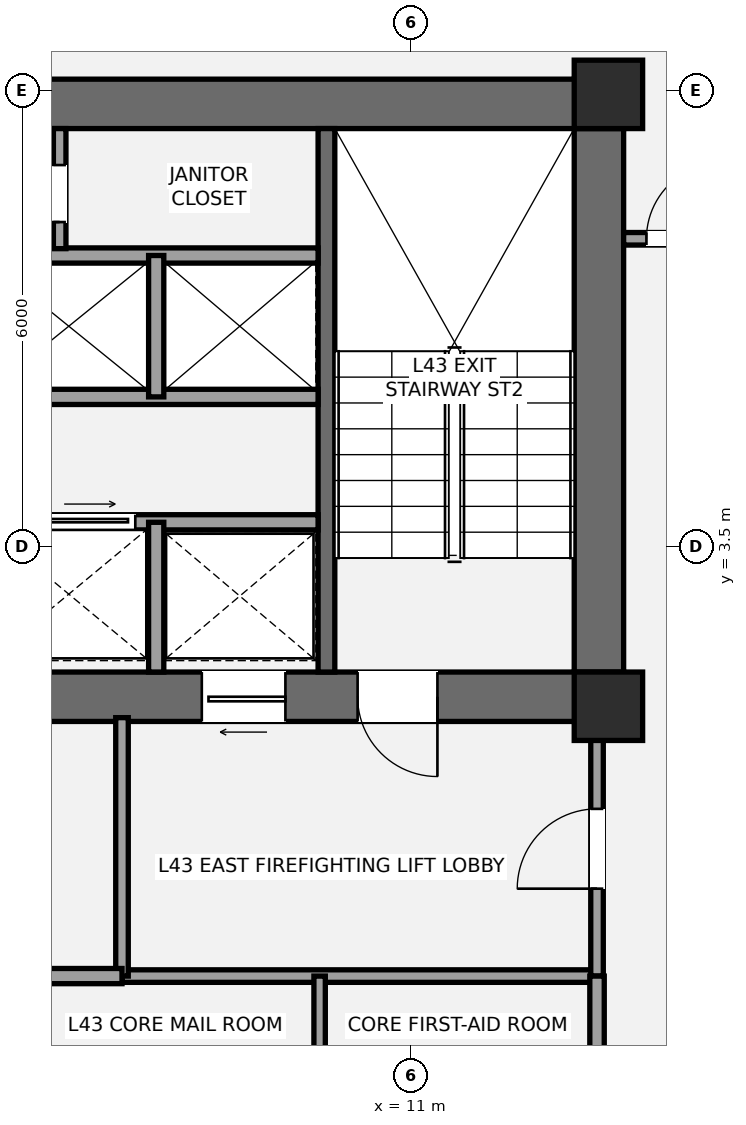
"""IFC4 building model, lengths in metres.
Left out: names, types, materials, properties, quantities, classifications, styles, units other than length and angle.
Written with IfcOpenShell. Run it as: python <this file> out.ifc"""

import sys

from ifc_helpers import new_model, si_unit, direction, frame, frame_2d, origin, origin_2d, place, context, subcontext, project, spatial, rectangle, extrude, element, fill, save


model = new_model("IFC4")
c1 = context("Model", 3, precision=1e-05, world=origin(), true_north=direction((0.0, 1.0)))
c2 = subcontext(c1, "Body", "Model", "MODEL_VIEW")
j1 = project(units=[si_unit("LENGTHUNIT", "METRE"), si_unit("PLANEANGLEUNIT", "RADIAN")], contexts=[c1])
p1 = place(None, origin())
s1 = spatial("IfcSite", under=j1, at=p1, CompositionType="ELEMENT")
p2 = place(p1, origin())
s2 = spatial("IfcBuilding", under=s1, at=p2, CompositionType="ELEMENT")
p3 = place(p2, frame((0.0, 0.0, 159.8)))
s3 = spatial("IfcBuildingStorey", under=s2, at=p3, CompositionType="ELEMENT", Elevation=159.8)
p4 = place(p3, frame((13.475, 1.2, 0.0), z_axis=(0.0, 0.0, 1.0), x_axis=(0.0, 1.0, 0.0)))
e1 = element("IfcWall", 1, at=p4, inside=s3, PredefinedType="SHEAR", context=c2, shape_type="SweptSolid", body=[
    extrude(rectangle(XDim=8.45, YDim=0.65, at=frame_2d((4.225, 0.0))), origin(), (0.0, 0.0, 1.0), 3.2),
])
p5 = place(p3, frame((4.475, 9.325, 0.0), z_axis=(0.0, 0.0, 1.0), x_axis=(1.0, 0.0, 0.0)))
e2 = element("IfcWall", 2, at=p5, inside=s3, PredefinedType="SHEAR", context=c2, shape_type="SweptSolid", body=[
    extrude(rectangle(XDim=9.325, YDim=0.65, at=frame_2d((4.663, 0.0))), origin(), (0.0, 0.0, 1.0), 3.2),
])
p6 = place(p3, frame((13.8, 1.525, 0.0), z_axis=(0.0, 0.0, 1.0), x_axis=(-1.0, 0.0, 0.0)))
e3 = element("IfcWall", 3, at=p6, inside=s3, PredefinedType="SHEAR", context=c2, shape_type="SweptSolid", body=[
    extrude(rectangle(XDim=8.925, YDim=0.65, at=frame_2d((4.462, 0.0))), origin(), (0.0, 0.0, 1.0), 3.2),
])
p7 = place(p6, frame((2.45, 0.0, 0.0)))
e4 = element("IfcOpeningElement", 4, at=p7, cuts=e3, PredefinedType="OPENING", context=c2, shape_type="SweptSolid", body=[
    extrude(rectangle(XDim=1.05, YDim=2.15, at=frame_2d((0.525, 1.075))), frame((0.0, 0.335, 0.0), z_axis=(0.0, -1.0, 0.0), x_axis=(1.0, 0.0, 0.0)), (0.0, 0.0, 1.0), 0.67),
])
p8 = place(p6, frame((4.45, 0.0, 0.0)))
e5 = element("IfcOpeningElement", 5, at=p8, cuts=e3, PredefinedType="OPENING", context=c2, shape_type="SweptSolid", body=[
    extrude(rectangle(XDim=1.1, YDim=2.2, at=frame_2d((0.55, 1.1))), frame((0.0, 0.335, 0.0), z_axis=(0.0, -1.0, 0.0), x_axis=(1.0, 0.0, 0.0)), (0.0, 0.0, 1.0), 0.67),
])
p9 = place(p3, frame((9.89, 1.85, 0.0), z_axis=(0.0, 0.0, 1.0), x_axis=(0.0, 1.0, 0.0)))
e6 = element("IfcWall", 6, at=p9, inside=s3, PredefinedType="SHEAR", context=c2, shape_type="SweptSolid", body=[
    extrude(rectangle(XDim=7.15, YDim=0.22, at=frame_2d((3.575, 0.0))), origin(), (0.0, 0.0, 1.0), 3.2),
])
for number, where, z_axis, x_axis in (
    (7, (13.6, 1.4, 0.0), (0.0, 0.0, 1.0), (1.0, 0.0, 0.0)),
    (8, (13.6, 9.45, 0.0), (0.0, 0.0, 1.0), (1.0, 0.0, 0.0)),
):
    element("IfcColumn", number, at=place(p3, frame(where, z_axis=z_axis, x_axis=x_axis)), inside=s3, PredefinedType="COLUMN", context=c2, shape_type="SweptSolid", body=[
        extrude(rectangle(XDim=0.9, YDim=0.9, at=origin_2d()), origin(), (0.0, 0.0, 1.0), 3.2),
    ])
p10 = place(p3, frame((7.2, -2.15, 0.0), z_axis=(0.0, 0.0, 1.0), x_axis=(1.0, 0.0, 0.0)))
e9 = element("IfcWall", 9, at=p10, inside=s3, PredefinedType="PARTITIONING", context=c2, shape_type="SweptSolid", body=[
    extrude(rectangle(XDim=6.25, YDim=0.165, at=frame_2d((3.125, 0.0))), origin(), (0.0, 0.0, 1.0), 3.02),
])
p11 = place(p3, frame((7.2, -2.15, 0.0), z_axis=(0.0, 0.0, 1.0), x_axis=(0.0, 1.0, 0.0)))
e10 = element("IfcWall", 10, at=p11, inside=s3, PredefinedType="PARTITIONING", context=c2, shape_type="SweptSolid", body=[
    extrude(rectangle(XDim=3.4, YDim=0.165, at=frame_2d((1.7, 0.0))), origin(), (0.0, 0.0, 1.0), 2.473),
])
p12 = place(p3, frame((13.45, -2.15, 0.0), z_axis=(0.0, 0.0, 1.0), x_axis=(0.0, 1.0, 0.0)))
e11 = element("IfcWall", 11, at=p12, inside=s3, PredefinedType="PARTITIONING", context=c2, shape_type="SweptSolid", body=[
    extrude(rectangle(XDim=3.4, YDim=0.165, at=frame_2d((1.7, 0.0))), origin(), (0.0, 0.0, 1.0), 3.02),
])
p13 = place(p12, frame((1.15, 0.0, 0.0)))
e12 = element("IfcOpeningElement", 12, at=p13, cuts=e11, PredefinedType="OPENING", context=c2, shape_type="SweptSolid", body=[
    extrude(rectangle(XDim=1.05, YDim=2.15, at=frame_2d((0.525, 1.075))), frame((0.0, 0.093, 0.0), z_axis=(0.0, -1.0, 0.0), x_axis=(1.0, 0.0, 0.0)), (0.0, 0.0, 1.0), 0.185),
])
p14 = place(p3, frame((4.95, -2.15, 0.0), z_axis=(0.0, 0.0, 1.0), x_axis=(1.0, 0.0, 0.0)))
e13 = element("IfcWall", 13, at=p14, inside=s3, PredefinedType="SOLIDWALL", context=c2, shape_type="SweptSolid", body=[
    extrude(rectangle(XDim=2.25, YDim=0.2, at=frame_2d((1.125, 0.0))), origin(), (0.0, 0.0, 1.0), 3.02),
])
p15 = place(p3, frame((5.525, 3.82, 0.0), z_axis=(0.0, 0.0, 1.0), x_axis=(1.0, 0.0, 0.0)))
e14 = element("IfcWall", 14, at=p15, inside=s3, PredefinedType="SOLIDWALL", context=c2, shape_type="SweptSolid", body=[
    extrude(rectangle(XDim=4.255, YDim=0.2, at=frame_2d((2.127, 0.0))), origin(), (0.0, 0.0, 1.0), 3.02),
])
p16 = place(p15, frame((0.65, 0.0, 0.0)))
e15 = element("IfcOpeningElement", 15, at=p16, cuts=e14, PredefinedType="OPENING", context=c2, shape_type="SweptSolid", body=[
    extrude(rectangle(XDim=1.2, YDim=2.2, at=frame_2d((0.6, 1.1))), frame((0.0, 0.11, 0.0), z_axis=(0.0, -1.0, 0.0), x_axis=(1.0, 0.0, 0.0)), (0.0, 0.0, 1.0), 0.22),
])
p17 = place(p3, frame((7.65, 1.85, 0.0), z_axis=(0.0, 0.0, 1.0), x_axis=(0.0, 1.0, 0.0)))
e16 = element("IfcWall", 16, at=p17, inside=s3, PredefinedType="SOLIDWALL", context=c2, shape_type="SweptSolid", body=[
    extrude(rectangle(XDim=1.97, YDim=0.2, at=frame_2d((0.985, 0.0))), origin(), (0.0, 0.0, 1.0), 3.02),
])
for number, where, z_axis, x_axis in (
    (17, (5.525, 5.47, 0.0), (0.0, 0.0, 1.0), (1.0, 0.0, 0.0)),
    (18, (5.525, 7.33, 0.0), (0.0, 0.0, 1.0), (1.0, 0.0, 0.0)),
):
    element("IfcWall", number, at=place(p3, frame(where, z_axis=z_axis, x_axis=x_axis)), inside=s3, PredefinedType="SOLIDWALL", context=c2, shape_type="SweptSolid", body=[
        extrude(rectangle(XDim=4.255, YDim=0.2, at=frame_2d((2.127, 0.0))), origin(), (0.0, 0.0, 1.0), 3.02),
    ])
p18 = place(p3, frame((7.65, 5.47, 0.0), z_axis=(0.0, 0.0, 1.0), x_axis=(0.0, 1.0, 0.0)))
e19 = element("IfcWall", 19, at=p18, inside=s3, PredefinedType="SOLIDWALL", context=c2, shape_type="SweptSolid", body=[
    extrude(rectangle(XDim=1.86, YDim=0.2, at=frame_2d((0.93, 0.0))), origin(), (0.0, 0.0, 1.0), 3.02),
])
p19 = place(p3, frame((6.38, 7.42, 0.0), z_axis=(0.0, 0.0, 1.0), x_axis=(0.0, 1.0, 0.0)))
e20 = element("IfcWall", 20, at=p19, inside=s3, PredefinedType="PARTITIONING", context=c2, shape_type="SweptSolid", body=[
    extrude(rectangle(XDim=1.58, YDim=0.165, at=frame_2d((0.79, 0.0))), origin(), (0.0, 0.0, 1.0), 3.02),
])
p20 = place(p19, frame((0.35, 0.0, 0.0)))
e21 = element("IfcOpeningElement", 21, at=p20, cuts=e20, PredefinedType="OPENING", context=c2, shape_type="SweptSolid", body=[
    extrude(rectangle(XDim=0.75, YDim=2.1, at=frame_2d((0.375, 1.05))), frame((0.0, 0.093, 0.0), z_axis=(0.0, -1.0, 0.0), x_axis=(1.0, 0.0, 0.0)), (0.0, 0.0, 1.0), 0.185),
])
p21 = place(p3, frame((13.45, -4.05, 0.0), z_axis=(0.0, 0.0, 1.0), x_axis=(0.0, 1.0, 0.0)))
e22 = element("IfcWall", 22, at=p21, inside=s3, PredefinedType="PLUMBINGWALL", context=c2, shape_type="SweptSolid", body=[
    extrude(rectangle(XDim=1.9, YDim=0.19, at=frame_2d((0.95, 0.0))), origin(), (0.0, 0.0, 1.0), 2.473),
])
p22 = place(p3, frame((9.8, -4.05, 0.0), z_axis=(0.0, 0.0, 1.0), x_axis=(0.0, 1.0, 0.0)))
e23 = element("IfcWall", 23, at=p22, inside=s3, PredefinedType="PLUMBINGWALL", context=c2, shape_type="SweptSolid", body=[
    extrude(rectangle(XDim=1.9, YDim=0.15, at=frame_2d((0.95, 0.0))), origin(), (0.0, 0.0, 1.0), 3.02),
])
p23 = place(p3, frame((13.8, 7.55, 0.0), z_axis=(0.0, 0.0, 1.0), x_axis=(1.0, 0.0, 0.0)))
e24 = element("IfcWall", 24, at=p23, inside=s3, PredefinedType="PARTITIONING", context=c2, shape_type="SweptSolid", body=[
    extrude(rectangle(XDim=1.75, YDim=0.165, at=frame_2d((0.875, 0.0))), origin(), (0.0, 0.0, 1.0), 2.473),
])
p24 = place(p23, frame((0.3, 0.0, 0.0)))
e25 = element("IfcOpeningElement", 25, at=p24, cuts=e24, PredefinedType="OPENING", context=c2, shape_type="SweptSolid", body=[
    extrude(rectangle(XDim=1.0, YDim=2.15, at=frame_2d((0.5, 1.075))), frame((0.0, 0.093, 0.0), z_axis=(0.0, -1.0, 0.0), x_axis=(1.0, 0.0, 0.0)), (0.0, 0.0, 1.0), 0.185),
])
p25 = place(p7, origin())
e26 = element("IfcDoor", 26, at=p25, inside=s3, OperationType="SINGLE_SWING_LEFT", PredefinedType="DOOR", context=c2, shape_type="SweptSolid", body=[
    extrude(rectangle(XDim=1.05, YDim=2.15, at=frame_2d((0.525, 1.075))), frame((0.0, 0.025, 0.0), z_axis=(0.0, -1.0, 0.0), x_axis=(1.0, 0.0, 0.0)), (0.0, 0.0, 1.0), 0.05),
])
fill(e4, e26)
p26 = place(p13, origin())
e27 = element("IfcDoor", 27, at=p26, inside=s3, OperationType="SINGLE_SWING_LEFT", PredefinedType="DOOR", context=c2, shape_type="SweptSolid", body=[
    extrude(rectangle(XDim=1.05, YDim=2.15, at=frame_2d((0.525, 1.075))), frame((0.0, 0.025, 0.0), z_axis=(0.0, -1.0, 0.0), x_axis=(1.0, 0.0, 0.0)), (0.0, 0.0, 1.0), 0.05),
])
fill(e12, e27)
p27 = place(p8, origin())
e28 = element("IfcDoor", 28, at=p27, inside=s3, OperationType="SLIDING_TO_LEFT", PredefinedType="DOOR", context=c2, shape_type="SweptSolid", body=[
    extrude(rectangle(XDim=1.1, YDim=2.2, at=frame_2d((0.55, 1.1))), frame((0.0, 0.025, 0.0), z_axis=(0.0, -1.0, 0.0), x_axis=(1.0, 0.0, 0.0)), (0.0, 0.0, 1.0), 0.05),
])
fill(e5, e28)
p28 = place(p16, origin())
e29 = element("IfcDoor", 29, at=p28, inside=s3, OperationType="SLIDING_TO_RIGHT", PredefinedType="DOOR", context=c2, shape_type="SweptSolid", body=[
    extrude(rectangle(XDim=1.2, YDim=2.2, at=frame_2d((0.6, 1.1))), frame((0.0, 0.025, 0.0), z_axis=(0.0, -1.0, 0.0), x_axis=(1.0, 0.0, 0.0)), (0.0, 0.0, 1.0), 0.05),
])
fill(e15, e29)
p29 = place(p20, origin())
e30 = element("IfcDoor", 30, at=p29, inside=s3, OperationType="SINGLE_SWING_LEFT", PredefinedType="DOOR", context=c2, shape_type="SweptSolid", body=[
    extrude(rectangle(XDim=0.75, YDim=2.1, at=frame_2d((0.375, 1.05))), frame((0.0, 0.025, 0.0), z_axis=(0.0, -1.0, 0.0), x_axis=(1.0, 0.0, 0.0)), (0.0, 0.0, 1.0), 0.05),
])
fill(e21, e30)
p30 = place(p24, origin())
e31 = element("IfcDoor", 31, at=p30, inside=s3, OperationType="SINGLE_SWING_RIGHT", PredefinedType="DOOR", context=c2, shape_type="SweptSolid", body=[
    extrude(rectangle(XDim=1.0, YDim=2.15, at=frame_2d((0.5, 1.075))), frame((0.0, 0.025, 0.0), z_axis=(0.0, -1.0, 0.0), x_axis=(1.0, 0.0, 0.0)), (0.0, 0.0, 1.0), 0.05),
])
fill(e25, e31)
save(model, sys.argv[1])
